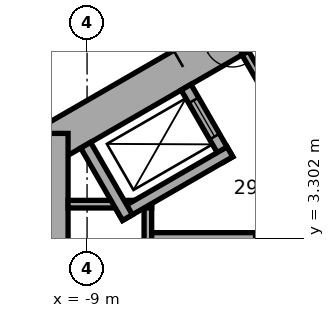
"""IFC4 building model, lengths in metres.
Left out: names, types, materials, properties, quantities, classifications, styles, units other than length and angle.
Written with IfcOpenShell. Run it as: python <this file> out.ifc"""

import sys

from ifc_helpers import new_model, si_unit, direction, frame, frame_2d, origin, place, context, subcontext, project, spatial, rectangle, extrude, element, fill, save


model = new_model("IFC4")
c1 = context("Model", 3, precision=1e-05, world=origin(), true_north=direction((0.0, 1.0)))
c2 = subcontext(c1, "Body", "Model", "MODEL_VIEW")
j1 = project(units=[si_unit("LENGTHUNIT", "METRE"), si_unit("PLANEANGLEUNIT", "RADIAN")], contexts=[c1])
p1 = place(None, origin())
s1 = spatial("IfcSite", under=j1, at=p1, CompositionType="ELEMENT")
p2 = place(p1, origin())
s2 = spatial("IfcBuilding", under=s1, at=p2, CompositionType="ELEMENT")
p3 = place(p2, frame((0.0, 0.0, 119.9)))
s3 = spatial("IfcBuildingStorey", under=s2, at=p3, CompositionType="ELEMENT", Elevation=119.9)
p4 = place(p3, frame((0.25, 11.691, 0.0), z_axis=(0.0, 0.0, 1.0), x_axis=(-0.866022616891, -0.50000482701, 0.0)))
e1 = element("IfcWall", 1, at=p4, inside=s3, PredefinedType="SHEAR", context=c2, shape_type="SweptSolid", body=[
    extrude(rectangle(XDim=12.125, YDim=1.0, at=frame_2d((6.062, 0.0))), origin(), (0.0, 0.0, 1.0), 4.5),
])
p5 = place(p4, frame((6.262, 0.0, 0.0)))
e2 = element("IfcOpeningElement", 2, at=p5, cuts=e1, PredefinedType="OPENING", context=c2, shape_type="SweptSolid", body=[
    extrude(rectangle(XDim=1.5, YDim=2.1, at=frame_2d((0.75, 1.05))), frame((0.0, 0.51, 0.0), z_axis=(0.0, -1.0, 0.0), x_axis=(1.0, 0.0, 0.0)), (0.0, 0.0, 1.0), 1.02),
])
p6 = place(p4, frame((1.712, 0.0, 0.0)))
e3 = element("IfcOpeningElement", 3, at=p6, cuts=e1, PredefinedType="OPENING", context=c2, shape_type="SweptSolid", body=[
    extrude(rectangle(XDim=1.1, YDim=2.1, at=frame_2d((0.55, 1.05))), frame((0.0, 0.51, 0.0), z_axis=(0.0, -1.0, 0.0), x_axis=(1.0, 0.0, 0.0)), (0.0, 0.0, 1.0), 1.02),
])
p7 = place(p3, frame((-10.0, 6.062, 0.0), z_axis=(0.0, 0.0, 1.0), x_axis=(0.0, -1.0, 0.0)))
e4 = element("IfcWall", 4, at=p7, inside=s3, PredefinedType="SHEAR", context=c2, shape_type="SweptSolid", body=[
    extrude(rectangle(XDim=12.125, YDim=1.0, at=frame_2d((6.062, 0.0))), origin(), (0.0, 0.0, 1.0), 4.5),
])
p8 = place(p7, frame((6.612, 0.0, 0.0)))
e5 = element("IfcOpeningElement", 5, at=p8, cuts=e4, PredefinedType="OPENING", context=c2, shape_type="SweptSolid", body=[
    extrude(rectangle(XDim=0.9, YDim=2.1, at=frame_2d((0.45, 1.05))), frame((0.0, 0.51, 0.0), z_axis=(0.0, -1.0, 0.0), x_axis=(1.0, 0.0, 0.0)), (0.0, 0.0, 1.0), 1.02),
])
p9 = place(p3, frame((-3.737, 6.272, 0.0), z_axis=(0.0, 0.0, 1.0), x_axis=(-0.50002983664, 0.866008176907, 0.0)))
e6 = element("IfcWall", 6, at=p9, inside=s3, PredefinedType="PARTITIONING", context=c2, shape_type="SweptSolid", body=[
    extrude(rectangle(XDim=2.2, YDim=0.2, at=frame_2d((1.1, 0.0))), origin(), (0.0, 0.0, 1.0), 4.22),
])
p10 = place(p3, frame((-7.4, 4.3, 0.0), z_axis=(0.0, 0.0, 1.0), x_axis=(0.0, -1.0, 0.0)))
e7 = element("IfcWall", 7, at=p10, inside=s3, PredefinedType="PARTITIONING", context=c2, shape_type="SweptSolid", body=[
    extrude(rectangle(XDim=8.0, YDim=0.2, at=frame_2d((4.0, 0.0))), origin(), (0.0, 0.0, 1.0), 4.22),
])
p11 = place(p3, frame((-7.3, 4.2, 0.0), z_axis=(0.0, 0.0, 1.0), x_axis=(-1.0, 0.0, 0.0)))
e8 = element("IfcWall", 8, at=p11, inside=s3, PredefinedType="PARTITIONING", context=c2, shape_type="SweptSolid", body=[
    extrude(rectangle(XDim=2.2, YDim=0.2, at=frame_2d((1.1, 0.0))), origin(), (0.0, 0.0, 1.0), 4.22),
])
p12 = place(p3, frame((-2.6, 3.3, 0.0), z_axis=(0.0, 0.0, 1.0), x_axis=(-1.0, 0.0, 0.0)))
e9 = element("IfcWall", 9, at=p12, inside=s3, PredefinedType="SHEAR", context=c2, shape_type="SweptSolid", body=[
    extrude(rectangle(XDim=4.7, YDim=0.3, at=frame_2d((2.35, 0.0))), origin(), (0.0, 0.0, 1.0), 4.22),
])
p13 = place(p12, frame((0.8, 0.0, 0.0)))
e10 = element("IfcOpeningElement", 10, at=p13, cuts=e9, PredefinedType="OPENING", context=c2, shape_type="SweptSolid", body=[
    extrude(rectangle(XDim=1.2, YDim=2.1, at=frame_2d((0.6, 1.05))), frame((0.0, 0.16, 0.0), z_axis=(0.0, -1.0, 0.0), x_axis=(1.0, 0.0, 0.0)), (0.0, 0.0, 1.0), 0.32),
])
p14 = place(p3, frame((-5.295, 5.372, 0.0), z_axis=(0.0, 0.0, 1.0), x_axis=(-0.500077893725, 0.86598042715, 0.0)))
e11 = element("IfcWall", 11, at=p14, inside=s3, PredefinedType="SHEAR", context=c2, shape_type="SweptSolid", body=[
    extrude(rectangle(XDim=2.2, YDim=0.3, at=frame_2d((1.1, 0.0))), origin(), (0.0, 0.0, 1.0), 4.22),
])
p15 = place(p14, frame((0.7, 0.0, 0.0)))
e12 = element("IfcOpeningElement", 12, at=p15, cuts=e11, PredefinedType="OPENING", context=c2, shape_type="SweptSolid", body=[
    extrude(rectangle(XDim=1.1, YDim=2.1, at=frame_2d((0.55, 1.05))), frame((0.0, 0.16, 0.0), z_axis=(0.0, -1.0, 0.0), x_axis=(1.0, 0.0, 0.0)), (0.0, 0.0, 1.0), 0.32),
])
p16 = place(p3, frame((-5.24, 5.577, 0.0), z_axis=(0.0, 0.0, 1.0), x_axis=(-0.866014461049, -0.500018952895, 0.0)))
e13 = element("IfcWall", 13, at=p16, inside=s3, PredefinedType="SHEAR", context=c2, shape_type="SweptSolid", body=[
    extrude(rectangle(XDim=3.35, YDim=0.3, at=frame_2d((1.675, 0.0))), origin(), (0.0, 0.0, 1.0), 4.22),
])
p17 = place(p3, frame((-7.937, 3.847, 0.0), z_axis=(0.0, 0.0, 1.0), x_axis=(-0.50002983664, 0.866008176907, 0.0)))
e14 = element("IfcWall", 14, at=p17, inside=s3, PredefinedType="SHEAR", context=c2, shape_type="SweptSolid", body=[
    extrude(rectangle(XDim=2.2, YDim=0.3, at=frame_2d((1.1, 0.0))), origin(), (0.0, 0.0, 1.0), 4.22),
])
p18 = place(p3, frame((-8.262, 10.818, 0.0), z_axis=(0.0, 0.0, 1.0), x_axis=(-0.866006491466, -0.500032755666, 0.0)))
e15 = element("IfcWall", 15, at=p18, inside=s3, PredefinedType="SOLIDWALL", context=c2, shape_type="SweptSolid", body=[
    extrude(rectangle(XDim=5.948, YDim=0.25, at=frame_2d((2.974, 0.0))), origin(), (0.0, 0.0, 1.0), 4.22),
])
p19 = place(p18, frame((0.65, 0.0, 0.0)))
e16 = element("IfcOpeningElement", 16, at=p19, cuts=e15, PredefinedType="OPENING", context=c2, shape_type="SweptSolid", body=[
    extrude(rectangle(XDim=1.4, YDim=2.1, at=frame_2d((0.7, 1.05))), frame((0.0, 0.135, 0.0), z_axis=(0.0, -1.0, 0.0), x_axis=(1.0, 0.0, 0.0)), (0.0, 0.0, 1.0), 0.27),
])
p20 = place(p5, origin())
e17 = element("IfcDoor", 17, at=p20, inside=s3, OperationType="DOUBLE_DOOR_SINGLE_SWING", PredefinedType="DOOR", context=c2, shape_type="SweptSolid", body=[
    extrude(rectangle(XDim=1.5, YDim=2.1, at=frame_2d((0.75, 1.05))), frame((0.0, 0.025, 0.0), z_axis=(0.0, -1.0, 0.0), x_axis=(1.0, 0.0, 0.0)), (0.0, 0.0, 1.0), 0.05),
])
fill(e2, e17)
p21 = place(p13, origin())
e18 = element("IfcDoor", 18, at=p21, inside=s3, OperationType="SINGLE_SWING_RIGHT", PredefinedType="DOOR", context=c2, shape_type="SweptSolid", body=[
    extrude(rectangle(XDim=1.2, YDim=2.1, at=frame_2d((0.6, 1.05))), frame((0.0, 0.025, 0.0), z_axis=(0.0, -1.0, 0.0), x_axis=(1.0, 0.0, 0.0)), (0.0, 0.0, 1.0), 0.05),
])
fill(e10, e18)
p22 = place(p15, origin())
e19 = element("IfcDoor", 19, at=p22, inside=s3, OperationType="DOUBLE_DOOR_SLIDING", PredefinedType="DOOR", context=c2, shape_type="SweptSolid", body=[
    extrude(rectangle(XDim=1.1, YDim=2.1, at=frame_2d((0.55, 1.05))), frame((0.0, 0.025, 0.0), z_axis=(0.0, -1.0, 0.0), x_axis=(1.0, 0.0, 0.0)), (0.0, 0.0, 1.0), 0.05),
])
fill(e12, e19)
save(model, sys.argv[1])
